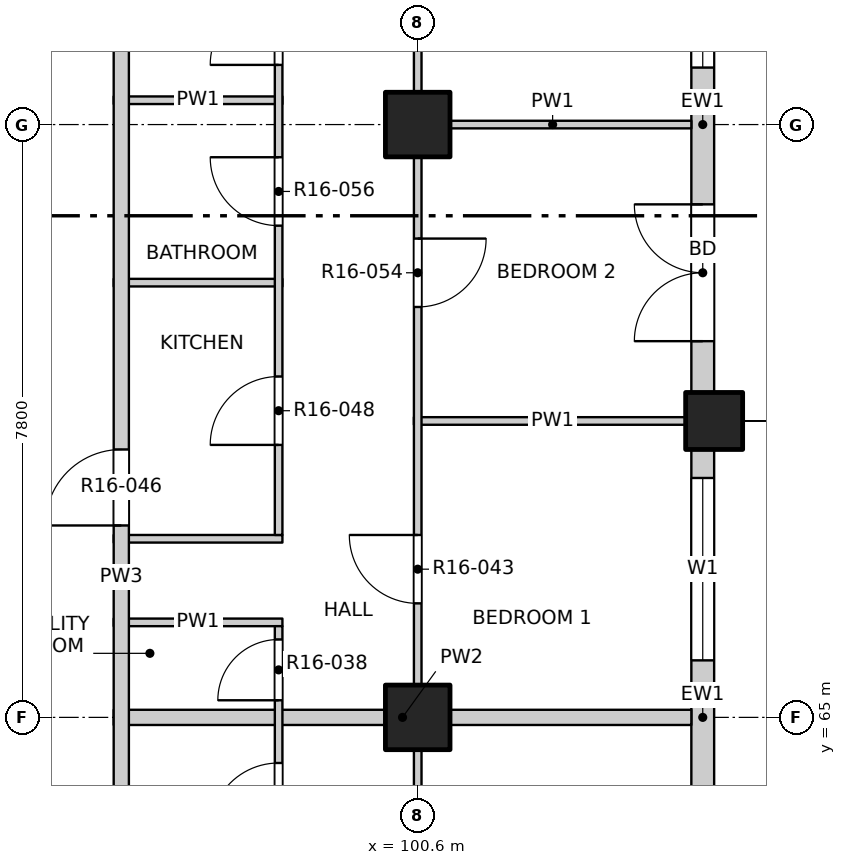
"""IFC4 building model, lengths in metres.
Left out: names, types, materials, properties, quantities, classifications, styles, units other than length and angle.
Written with IfcOpenShell. Run it as: python <this file> out.ifc"""

import sys

from ifc_helpers import new_model, si_unit, direction, frame, frame_2d, origin, origin_2d, place, context, subcontext, project, spatial, rectangle, extrude, element, fill, save


model = new_model("IFC4")
c1 = context("Model", 3, precision=1e-05, world=origin(), true_north=direction((0.0, 1.0)))
c2 = subcontext(c1, "Body", "Model", "MODEL_VIEW")
j1 = project(units=[si_unit("LENGTHUNIT", "METRE"), si_unit("PLANEANGLEUNIT", "RADIAN")], contexts=[c1])
p1 = place(None, origin())
s1 = spatial("IfcSite", under=j1, at=p1, CompositionType="ELEMENT")
p2 = place(p1, origin())
s2 = spatial("IfcBuilding", under=s1, at=p2, CompositionType="ELEMENT")
p3 = place(p2, frame((0.0, 0.0, 169.0)))
s3 = spatial("IfcBuildingStorey", under=s2, at=p3, CompositionType="ELEMENT", Elevation=169.0)
p4 = place(p3, frame((104.5, 68.9, -0.25), z_axis=(0.0, 0.0, 1.0), x_axis=(1.0, 0.0, 0.0)))
e1 = element("IfcColumn", 1, at=p4, inside=s3, PredefinedType="COLUMN", context=c2, shape_type="SweptSolid", body=[
    extrude(rectangle(XDim=0.75, YDim=0.75, at=origin_2d()), origin(), (0.0, 0.0, 1.0), 3.35),
])
for number, where, z_axis, x_axis in (
    (2, (100.6, 65.0, -0.25), (0.0, 0.0, 1.0), (1.0, 0.0, 0.0)),
    (3, (100.6, 72.8, -0.25), (0.0, 0.0, 1.0), (1.0, 0.0, 0.0)),
):
    element("IfcColumn", number, at=place(p3, frame(where, z_axis=z_axis, x_axis=x_axis)), inside=s3, PredefinedType="COLUMN", context=c2, shape_type="SweptSolid", body=[
        extrude(rectangle(XDim=0.85, YDim=0.85, at=origin_2d()), origin(), (0.0, 0.0, 1.0), 3.35),
    ])
p5 = place(p3, frame((104.35, 61.475, 0.0), z_axis=(0.0, 0.0, 1.0), x_axis=(0.0, 1.0, 0.0)))
e4 = element("IfcWall", 4, at=p5, inside=s3, PredefinedType="SOLIDWALL", context=c2, shape_type="SweptSolid", body=[
    extrude(rectangle(XDim=7.05, YDim=0.3, at=frame_2d((3.525, 0.0))), origin(), (0.0, 0.0, 1.0), 3.1),
])
p6 = place(p5, frame((0.675, 0.0, 0.0)))
e5 = element("IfcOpeningElement", 5, at=p6, cuts=e4, PredefinedType="OPENING", context=c2, shape_type="SweptSolid", body=[
    extrude(rectangle(XDim=1.8, YDim=2.4, at=frame_2d((0.9, 1.2))), frame((0.0, 0.16, 0.0), z_axis=(0.0, -1.0, 0.0), x_axis=(1.0, 0.0, 0.0)), (0.0, 0.0, 1.0), 0.32),
])
p7 = place(p5, frame((4.275, 0.0, 0.9)))
e6 = element("IfcOpeningElement", 6, at=p7, cuts=e4, PredefinedType="OPENING", context=c2, shape_type="SweptSolid", body=[
    extrude(rectangle(XDim=2.4, YDim=1.8, at=frame_2d((1.2, 0.9))), frame((0.0, 0.16, 0.0), z_axis=(0.0, -1.0, 0.0), x_axis=(1.0, 0.0, 0.0)), (0.0, 0.0, 1.0), 0.32),
])
p8 = place(p3, frame((104.35, 69.275, 0.0), z_axis=(0.0, 0.0, 1.0), x_axis=(0.0, 1.0, 0.0)))
e7 = element("IfcWall", 7, at=p8, inside=s3, PredefinedType="SOLIDWALL", context=c2, shape_type="SweptSolid", body=[
    extrude(rectangle(XDim=7.05, YDim=0.3, at=frame_2d((3.525, 0.0))), origin(), (0.0, 0.0, 1.0), 3.1),
])
p9 = place(p8, frame((0.675, 0.0, 0.0)))
e8 = element("IfcOpeningElement", 8, at=p9, cuts=e7, PredefinedType="OPENING", context=c2, shape_type="SweptSolid", body=[
    extrude(rectangle(XDim=1.8, YDim=2.4, at=frame_2d((0.9, 1.2))), frame((0.0, 0.16, 0.0), z_axis=(0.0, -1.0, 0.0), x_axis=(1.0, 0.0, 0.0)), (0.0, 0.0, 1.0), 0.32),
])
p10 = place(p8, frame((4.275, 0.0, 0.9)))
e9 = element("IfcOpeningElement", 9, at=p10, cuts=e7, PredefinedType="OPENING", context=c2, shape_type="SweptSolid", body=[
    extrude(rectangle(XDim=2.4, YDim=1.8, at=frame_2d((1.2, 0.9))), frame((0.0, 0.16, 0.0), z_axis=(0.0, -1.0, 0.0), x_axis=(1.0, 0.0, 0.0)), (0.0, 0.0, 1.0), 0.32),
])
p11 = place(p3, frame((96.6, 65.0, 0.0), z_axis=(0.0, 0.0, 1.0), x_axis=(1.0, 0.0, 0.0)))
e10 = element("IfcWall", 10, at=p11, inside=s3, PredefinedType="PARTITIONING", context=c2, shape_type="SweptSolid", body=[
    extrude(rectangle(XDim=7.6, YDim=0.2, at=frame_2d((3.8, 0.0))), origin(), (0.0, 0.0, 1.0), 3.1),
])
for number, where, z_axis, x_axis in (
    (11, (96.6, 66.25, 0.0), (0.0, 0.0, 1.0), (1.0, 0.0, 0.0)),
    (12, (96.6, 67.35, 0.0), (0.0, 0.0, 1.0), (1.0, 0.0, 0.0)),
):
    element("IfcWall", number, at=place(p3, frame(where, z_axis=z_axis, x_axis=x_axis)), inside=s3, PredefinedType="PARTITIONING", context=c2, shape_type="SweptSolid", body=[
        extrude(rectangle(XDim=2.22, YDim=0.1, at=frame_2d((1.11, 0.0))), origin(), (0.0, 0.0, 1.0), 3.1),
    ])
p12 = place(p3, frame((100.55, 68.9, 0.0), z_axis=(0.0, 0.0, 1.0), x_axis=(1.0, 0.0, 0.0)))
e13 = element("IfcWall", 13, at=p12, inside=s3, PredefinedType="PARTITIONING", context=c2, shape_type="SweptSolid", body=[
    extrude(rectangle(XDim=3.65, YDim=0.1, at=frame_2d((1.825, 0.0))), origin(), (0.0, 0.0, 1.0), 3.1),
])
p13 = place(p3, frame((96.6, 70.72, 0.0), z_axis=(0.0, 0.0, 1.0), x_axis=(1.0, 0.0, 0.0)))
e14 = element("IfcWall", 14, at=p13, inside=s3, PredefinedType="PARTITIONING", context=c2, shape_type="SweptSolid", body=[
    extrude(rectangle(XDim=2.22, YDim=0.1, at=frame_2d((1.11, 0.0))), origin(), (0.0, 0.0, 1.0), 3.1),
])
p14 = place(p3, frame((100.55, 72.8, 0.0), z_axis=(0.0, 0.0, 1.0), x_axis=(1.0, 0.0, 0.0)))
e15 = element("IfcWall", 15, at=p14, inside=s3, PredefinedType="PARTITIONING", context=c2, shape_type="SweptSolid", body=[
    extrude(rectangle(XDim=3.65, YDim=0.1, at=frame_2d((1.825, 0.0))), origin(), (0.0, 0.0, 1.0), 3.1),
])
p15 = place(p3, frame((96.6, 73.12, 0.0), z_axis=(0.0, 0.0, 1.0), x_axis=(1.0, 0.0, 0.0)))
e16 = element("IfcWall", 16, at=p15, inside=s3, PredefinedType="PARTITIONING", context=c2, shape_type="SweptSolid", body=[
    extrude(rectangle(XDim=2.22, YDim=0.1, at=frame_2d((1.11, 0.0))), origin(), (0.0, 0.0, 1.0), 3.1),
])
p16 = place(p3, frame((96.7, 49.5, 0.0), z_axis=(0.0, 0.0, 1.0), x_axis=(0.0, 1.0, 0.0)))
e17 = element("IfcWall", 17, at=p16, inside=s3, PredefinedType="PARTITIONING", context=c2, shape_type="SweptSolid", body=[
    extrude(rectangle(XDim=34.7, YDim=0.2, at=frame_2d((17.35, 0.0))), origin(), (0.0, 0.0, 1.0), 3.1),
])
p17 = place(p16, frame((6.875, 0.0, 0.0)))
e18 = element("IfcOpeningElement", 18, at=p17, cuts=e17, PredefinedType="OPENING", context=c2, shape_type="SweptSolid", body=[
    extrude(rectangle(XDim=1.0, YDim=2.1, at=frame_2d((0.5, 1.05))), frame((0.0, 0.11, 0.0), z_axis=(0.0, -1.0, 0.0), x_axis=(1.0, 0.0, 0.0)), (0.0, 0.0, 1.0), 0.22),
])
p18 = place(p16, frame((18.025, 0.0, 0.0)))
e19 = element("IfcOpeningElement", 19, at=p18, cuts=e17, PredefinedType="OPENING", context=c2, shape_type="SweptSolid", body=[
    extrude(rectangle(XDim=1.0, YDim=2.1, at=frame_2d((0.5, 1.05))), frame((0.0, 0.11, 0.0), z_axis=(0.0, -1.0, 0.0), x_axis=(1.0, 0.0, 0.0)), (0.0, 0.0, 1.0), 0.22),
])
p19 = place(p3, frame((98.77, 56.25, 0.0), z_axis=(0.0, 0.0, 1.0), x_axis=(0.0, 1.0, 0.0)))
e20 = element("IfcWall", 20, at=p19, inside=s3, PredefinedType="PARTITIONING", context=c2, shape_type="SweptSolid", body=[
    extrude(rectangle(XDim=9.95, YDim=0.1, at=frame_2d((4.975, 0.0))), origin(), (0.0, 0.0, 1.0), 3.1),
])
p20 = place(p19, frame((0.625, 0.0, 0.0)))
e21 = element("IfcOpeningElement", 21, at=p20, cuts=e20, PredefinedType="OPENING", context=c2, shape_type="SweptSolid", body=[
    extrude(rectangle(XDim=0.8, YDim=2.1, at=frame_2d((0.4, 1.05))), frame((0.0, 0.06, 0.0), z_axis=(0.0, -1.0, 0.0), x_axis=(1.0, 0.0, 0.0)), (0.0, 0.0, 1.0), 0.12),
])
p21 = place(p19, frame((2.96, 0.0, 0.0)))
e22 = element("IfcOpeningElement", 22, at=p21, cuts=e20, PredefinedType="OPENING", context=c2, shape_type="SweptSolid", body=[
    extrude(rectangle(XDim=0.9, YDim=2.1, at=frame_2d((0.45, 1.05))), frame((0.0, 0.06, 0.0), z_axis=(0.0, -1.0, 0.0), x_axis=(1.0, 0.0, 0.0)), (0.0, 0.0, 1.0), 0.12),
])
p22 = place(p19, frame((5.235, 0.0, 0.0)))
e23 = element("IfcOpeningElement", 23, at=p22, cuts=e20, PredefinedType="OPENING", context=c2, shape_type="SweptSolid", body=[
    extrude(rectangle(XDim=0.9, YDim=2.1, at=frame_2d((0.45, 1.05))), frame((0.0, 0.06, 0.0), z_axis=(0.0, -1.0, 0.0), x_axis=(1.0, 0.0, 0.0)), (0.0, 0.0, 1.0), 0.12),
])
p23 = place(p19, frame((7.25, 0.0, 0.0)))
e24 = element("IfcOpeningElement", 24, at=p23, cuts=e20, PredefinedType="OPENING", context=c2, shape_type="SweptSolid", body=[
    extrude(rectangle(XDim=0.9, YDim=2.1, at=frame_2d((0.45, 1.05))), frame((0.0, 0.06, 0.0), z_axis=(0.0, -1.0, 0.0), x_axis=(1.0, 0.0, 0.0)), (0.0, 0.0, 1.0), 0.12),
])
p24 = place(p19, frame((8.975, 0.0, 0.0)))
e25 = element("IfcOpeningElement", 25, at=p24, cuts=e20, PredefinedType="OPENING", context=c2, shape_type="SweptSolid", body=[
    extrude(rectangle(XDim=0.8, YDim=2.1, at=frame_2d((0.4, 1.05))), frame((0.0, 0.06, 0.0), z_axis=(0.0, -1.0, 0.0), x_axis=(1.0, 0.0, 0.0)), (0.0, 0.0, 1.0), 0.12),
])
p25 = place(p3, frame((98.77, 67.4, 0.0), z_axis=(0.0, 0.0, 1.0), x_axis=(0.0, 1.0, 0.0)))
e26 = element("IfcWall", 26, at=p25, inside=s3, PredefinedType="PARTITIONING", context=c2, shape_type="SweptSolid", body=[
    extrude(rectangle(XDim=13.15, YDim=0.1, at=frame_2d((6.575, 0.0))), origin(), (0.0, 0.0, 1.0), 3.1),
])
p26 = place(p25, frame((1.185, 0.0, 0.0)))
e27 = element("IfcOpeningElement", 27, at=p26, cuts=e26, PredefinedType="OPENING", context=c2, shape_type="SweptSolid", body=[
    extrude(rectangle(XDim=0.9, YDim=2.1, at=frame_2d((0.45, 1.05))), frame((0.0, 0.06, 0.0), z_axis=(0.0, -1.0, 0.0), x_axis=(1.0, 0.0, 0.0)), (0.0, 0.0, 1.0), 0.12),
])
p27 = place(p25, frame((4.07, 0.0, 0.0)))
e28 = element("IfcOpeningElement", 28, at=p27, cuts=e26, PredefinedType="OPENING", context=c2, shape_type="SweptSolid", body=[
    extrude(rectangle(XDim=0.9, YDim=2.1, at=frame_2d((0.45, 1.05))), frame((0.0, 0.06, 0.0), z_axis=(0.0, -1.0, 0.0), x_axis=(1.0, 0.0, 0.0)), (0.0, 0.0, 1.0), 0.12),
])
p28 = place(p25, frame((6.185, 0.0, 0.0)))
e29 = element("IfcOpeningElement", 29, at=p28, cuts=e26, PredefinedType="OPENING", context=c2, shape_type="SweptSolid", body=[
    extrude(rectangle(XDim=0.9, YDim=2.1, at=frame_2d((0.45, 1.05))), frame((0.0, 0.06, 0.0), z_axis=(0.0, -1.0, 0.0), x_axis=(1.0, 0.0, 0.0)), (0.0, 0.0, 1.0), 0.12),
])
p29 = place(p25, frame((8.525, 0.0, 0.0)))
e30 = element("IfcOpeningElement", 30, at=p29, cuts=e26, PredefinedType="OPENING", context=c2, shape_type="SweptSolid", body=[
    extrude(rectangle(XDim=0.8, YDim=2.1, at=frame_2d((0.4, 1.05))), frame((0.0, 0.06, 0.0), z_axis=(0.0, -1.0, 0.0), x_axis=(1.0, 0.0, 0.0)), (0.0, 0.0, 1.0), 0.12),
])
p30 = place(p25, frame((11.35, 0.0, 0.0)))
e31 = element("IfcOpeningElement", 31, at=p30, cuts=e26, PredefinedType="OPENING", context=c2, shape_type="SweptSolid", body=[
    extrude(rectangle(XDim=0.8, YDim=2.1, at=frame_2d((0.4, 1.05))), frame((0.0, 0.06, 0.0), z_axis=(0.0, -1.0, 0.0), x_axis=(1.0, 0.0, 0.0)), (0.0, 0.0, 1.0), 0.12),
])
p31 = place(p3, frame((100.6, 45.8, 0.0), z_axis=(0.0, 0.0, 1.0), x_axis=(0.0, 1.0, 0.0)))
e32 = element("IfcWall", 32, at=p31, inside=s3, PredefinedType="PARTITIONING", context=c2, shape_type="SweptSolid", body=[
    extrude(rectangle(XDim=38.4, YDim=0.1, at=frame_2d((19.2, 0.0))), origin(), (0.0, 0.0, 1.0), 3.1),
])
p32 = place(p31, frame((1.05, 0.0, 0.0)))
e33 = element("IfcOpeningElement", 33, at=p32, cuts=e32, PredefinedType="OPENING", context=c2, shape_type="SweptSolid", body=[
    extrude(rectangle(XDim=1.2, YDim=2.1, at=frame_2d((0.6, 1.05))), frame((0.0, 0.06, 0.0), z_axis=(0.0, -1.0, 0.0), x_axis=(1.0, 0.0, 0.0)), (0.0, 0.0, 1.0), 0.12),
])
p33 = place(p31, frame((6.9, 0.0, 0.0)))
e34 = element("IfcOpeningElement", 34, at=p33, cuts=e32, PredefinedType="OPENING", context=c2, shape_type="SweptSolid", body=[
    extrude(rectangle(XDim=1.2, YDim=2.1, at=frame_2d((0.6, 1.05))), frame((0.0, 0.06, 0.0), z_axis=(0.0, -1.0, 0.0), x_axis=(1.0, 0.0, 0.0)), (0.0, 0.0, 1.0), 0.12),
])
p34 = place(p31, frame((12.9, 0.0, 0.0)))
e35 = element("IfcOpeningElement", 35, at=p34, cuts=e32, PredefinedType="OPENING", context=c2, shape_type="SweptSolid", body=[
    extrude(rectangle(XDim=0.9, YDim=2.1, at=frame_2d((0.45, 1.05))), frame((0.0, 0.06, 0.0), z_axis=(0.0, -1.0, 0.0), x_axis=(1.0, 0.0, 0.0)), (0.0, 0.0, 1.0), 0.12),
])
p35 = place(p31, frame((16.8, 0.0, 0.0)))
e36 = element("IfcOpeningElement", 36, at=p35, cuts=e32, PredefinedType="OPENING", context=c2, shape_type="SweptSolid", body=[
    extrude(rectangle(XDim=0.9, YDim=2.1, at=frame_2d((0.45, 1.05))), frame((0.0, 0.06, 0.0), z_axis=(0.0, -1.0, 0.0), x_axis=(1.0, 0.0, 0.0)), (0.0, 0.0, 1.0), 0.12),
])
p36 = place(p31, frame((20.7, 0.0, 0.0)))
e37 = element("IfcOpeningElement", 37, at=p36, cuts=e32, PredefinedType="OPENING", context=c2, shape_type="SweptSolid", body=[
    extrude(rectangle(XDim=0.9, YDim=2.1, at=frame_2d((0.45, 1.05))), frame((0.0, 0.06, 0.0), z_axis=(0.0, -1.0, 0.0), x_axis=(1.0, 0.0, 0.0)), (0.0, 0.0, 1.0), 0.12),
])
p37 = place(p31, frame((24.6, 0.0, 0.0)))
e38 = element("IfcOpeningElement", 38, at=p37, cuts=e32, PredefinedType="OPENING", context=c2, shape_type="SweptSolid", body=[
    extrude(rectangle(XDim=0.9, YDim=2.1, at=frame_2d((0.45, 1.05))), frame((0.0, 0.06, 0.0), z_axis=(0.0, -1.0, 0.0), x_axis=(1.0, 0.0, 0.0)), (0.0, 0.0, 1.0), 0.12),
])
p38 = place(p31, frame((28.5, 0.0, 0.0)))
e39 = element("IfcOpeningElement", 39, at=p38, cuts=e32, PredefinedType="OPENING", context=c2, shape_type="SweptSolid", body=[
    extrude(rectangle(XDim=0.9, YDim=2.1, at=frame_2d((0.45, 1.05))), frame((0.0, 0.06, 0.0), z_axis=(0.0, -1.0, 0.0), x_axis=(1.0, 0.0, 0.0)), (0.0, 0.0, 1.0), 0.12),
])
p39 = place(p31, frame((32.4, 0.0, 0.0)))
e40 = element("IfcOpeningElement", 40, at=p39, cuts=e32, PredefinedType="OPENING", context=c2, shape_type="SweptSolid", body=[
    extrude(rectangle(XDim=0.9, YDim=2.1, at=frame_2d((0.45, 1.05))), frame((0.0, 0.06, 0.0), z_axis=(0.0, -1.0, 0.0), x_axis=(1.0, 0.0, 0.0)), (0.0, 0.0, 1.0), 0.12),
])
p40 = place(p31, frame((36.15, 0.0, 0.0)))
e41 = element("IfcOpeningElement", 41, at=p40, cuts=e32, PredefinedType="OPENING", context=c2, shape_type="SweptSolid", body=[
    extrude(rectangle(XDim=1.2, YDim=2.1, at=frame_2d((0.6, 1.05))), frame((0.0, 0.06, 0.0), z_axis=(0.0, -1.0, 0.0), x_axis=(1.0, 0.0, 0.0)), (0.0, 0.0, 1.0), 0.12),
])
p41 = place(p7, origin())
e42 = element("IfcWindow", 42, at=p41, inside=s3, PartitioningType="DOUBLE_PANEL_VERTICAL", PredefinedType="WINDOW", context=c2, shape_type="SweptSolid", body=[
    extrude(rectangle(XDim=2.4, YDim=1.8, at=frame_2d((1.2, 0.9))), frame((0.0, 0.03, 0.0), z_axis=(0.0, -1.0, 0.0), x_axis=(1.0, 0.0, 0.0)), (0.0, 0.0, 1.0), 0.06),
])
fill(e6, e42)
p42 = place(p9, origin())
e43 = element("IfcDoor", 43, at=p42, inside=s3, OperationType="DOUBLE_DOOR_SINGLE_SWING", PredefinedType="DOOR", context=c2, shape_type="SweptSolid", body=[
    extrude(rectangle(XDim=1.8, YDim=2.4, at=frame_2d((0.9, 1.2))), frame((0.0, 0.025, 0.0), z_axis=(0.0, -1.0, 0.0), x_axis=(1.0, 0.0, 0.0)), (0.0, 0.0, 1.0), 0.05),
])
fill(e8, e43)
p43 = place(p10, origin())
e44 = element("IfcWindow", 44, at=p43, inside=s3, PartitioningType="DOUBLE_PANEL_VERTICAL", PredefinedType="WINDOW", context=c2, shape_type="SweptSolid", body=[
    extrude(rectangle(XDim=2.4, YDim=1.8, at=frame_2d((1.2, 0.9))), frame((0.0, 0.03, 0.0), z_axis=(0.0, -1.0, 0.0), x_axis=(1.0, 0.0, 0.0)), (0.0, 0.0, 1.0), 0.06),
])
fill(e9, e44)
p44 = place(p23, origin())
e45 = element("IfcDoor", 45, at=p44, inside=s3, OperationType="SINGLE_SWING_LEFT", PredefinedType="DOOR", context=c2, shape_type="SweptSolid", body=[
    extrude(rectangle(XDim=0.9, YDim=2.1, at=frame_2d((0.45, 1.05))), frame((0.0, 0.025, 0.0), z_axis=(0.0, -1.0, 0.0), x_axis=(1.0, 0.0, 0.0)), (0.0, 0.0, 1.0), 0.05),
])
fill(e24, e45)
p45 = place(p24, origin())
e46 = element("IfcDoor", 46, at=p45, inside=s3, OperationType="SINGLE_SWING_LEFT", PredefinedType="DOOR", context=c2, shape_type="SweptSolid", body=[
    extrude(rectangle(XDim=0.8, YDim=2.1, at=frame_2d((0.4, 1.05))), frame((0.0, 0.025, 0.0), z_axis=(0.0, -1.0, 0.0), x_axis=(1.0, 0.0, 0.0)), (0.0, 0.0, 1.0), 0.05),
])
fill(e25, e46)
p46 = place(p36, origin())
e47 = element("IfcDoor", 47, at=p46, inside=s3, OperationType="SINGLE_SWING_RIGHT", PredefinedType="DOOR", context=c2, shape_type="SweptSolid", body=[
    extrude(rectangle(XDim=0.9, YDim=2.1, at=frame_2d((0.45, 1.05))), frame((0.0, 0.025, 0.0), z_axis=(0.0, -1.0, 0.0), x_axis=(1.0, 0.0, 0.0)), (0.0, 0.0, 1.0), 0.05),
])
fill(e37, e47)
p47 = place(p18, origin())
e48 = element("IfcDoor", 48, at=p47, inside=s3, OperationType="SINGLE_SWING_LEFT", PredefinedType="DOOR", context=c2, shape_type="SweptSolid", body=[
    extrude(rectangle(XDim=1.0, YDim=2.1, at=frame_2d((0.5, 1.05))), frame((0.0, 0.025, 0.0), z_axis=(0.0, -1.0, 0.0), x_axis=(1.0, 0.0, 0.0)), (0.0, 0.0, 1.0), 0.05),
])
fill(e19, e48)
p48 = place(p26, origin())
e49 = element("IfcDoor", 49, at=p48, inside=s3, OperationType="SINGLE_SWING_LEFT", PredefinedType="DOOR", context=c2, shape_type="SweptSolid", body=[
    extrude(rectangle(XDim=0.9, YDim=2.1, at=frame_2d((0.45, 1.05))), frame((0.0, 0.025, 0.0), z_axis=(0.0, -1.0, 0.0), x_axis=(1.0, 0.0, 0.0)), (0.0, 0.0, 1.0), 0.05),
])
fill(e27, e49)
p49 = place(p37, origin())
e50 = element("IfcDoor", 50, at=p49, inside=s3, OperationType="SINGLE_SWING_LEFT", PredefinedType="DOOR", context=c2, shape_type="SweptSolid", body=[
    extrude(rectangle(XDim=0.9, YDim=2.1, at=frame_2d((0.45, 1.05))), frame((0.0, 0.025, 0.0), z_axis=(0.0, -1.0, 0.0), x_axis=(1.0, 0.0, 0.0)), (0.0, 0.0, 1.0), 0.05),
])
fill(e38, e50)
p50 = place(p27, origin())
e51 = element("IfcDoor", 51, at=p50, inside=s3, OperationType="SINGLE_SWING_RIGHT", PredefinedType="DOOR", context=c2, shape_type="SweptSolid", body=[
    extrude(rectangle(XDim=0.9, YDim=2.1, at=frame_2d((0.45, 1.05))), frame((0.0, 0.025, 0.0), z_axis=(0.0, -1.0, 0.0), x_axis=(1.0, 0.0, 0.0)), (0.0, 0.0, 1.0), 0.05),
])
fill(e28, e51)
p51 = place(p28, origin())
e52 = element("IfcDoor", 52, at=p51, inside=s3, OperationType="SINGLE_SWING_LEFT", PredefinedType="DOOR", context=c2, shape_type="SweptSolid", body=[
    extrude(rectangle(XDim=0.9, YDim=2.1, at=frame_2d((0.45, 1.05))), frame((0.0, 0.025, 0.0), z_axis=(0.0, -1.0, 0.0), x_axis=(1.0, 0.0, 0.0)), (0.0, 0.0, 1.0), 0.05),
])
fill(e29, e52)
save(model, sys.argv[1])
